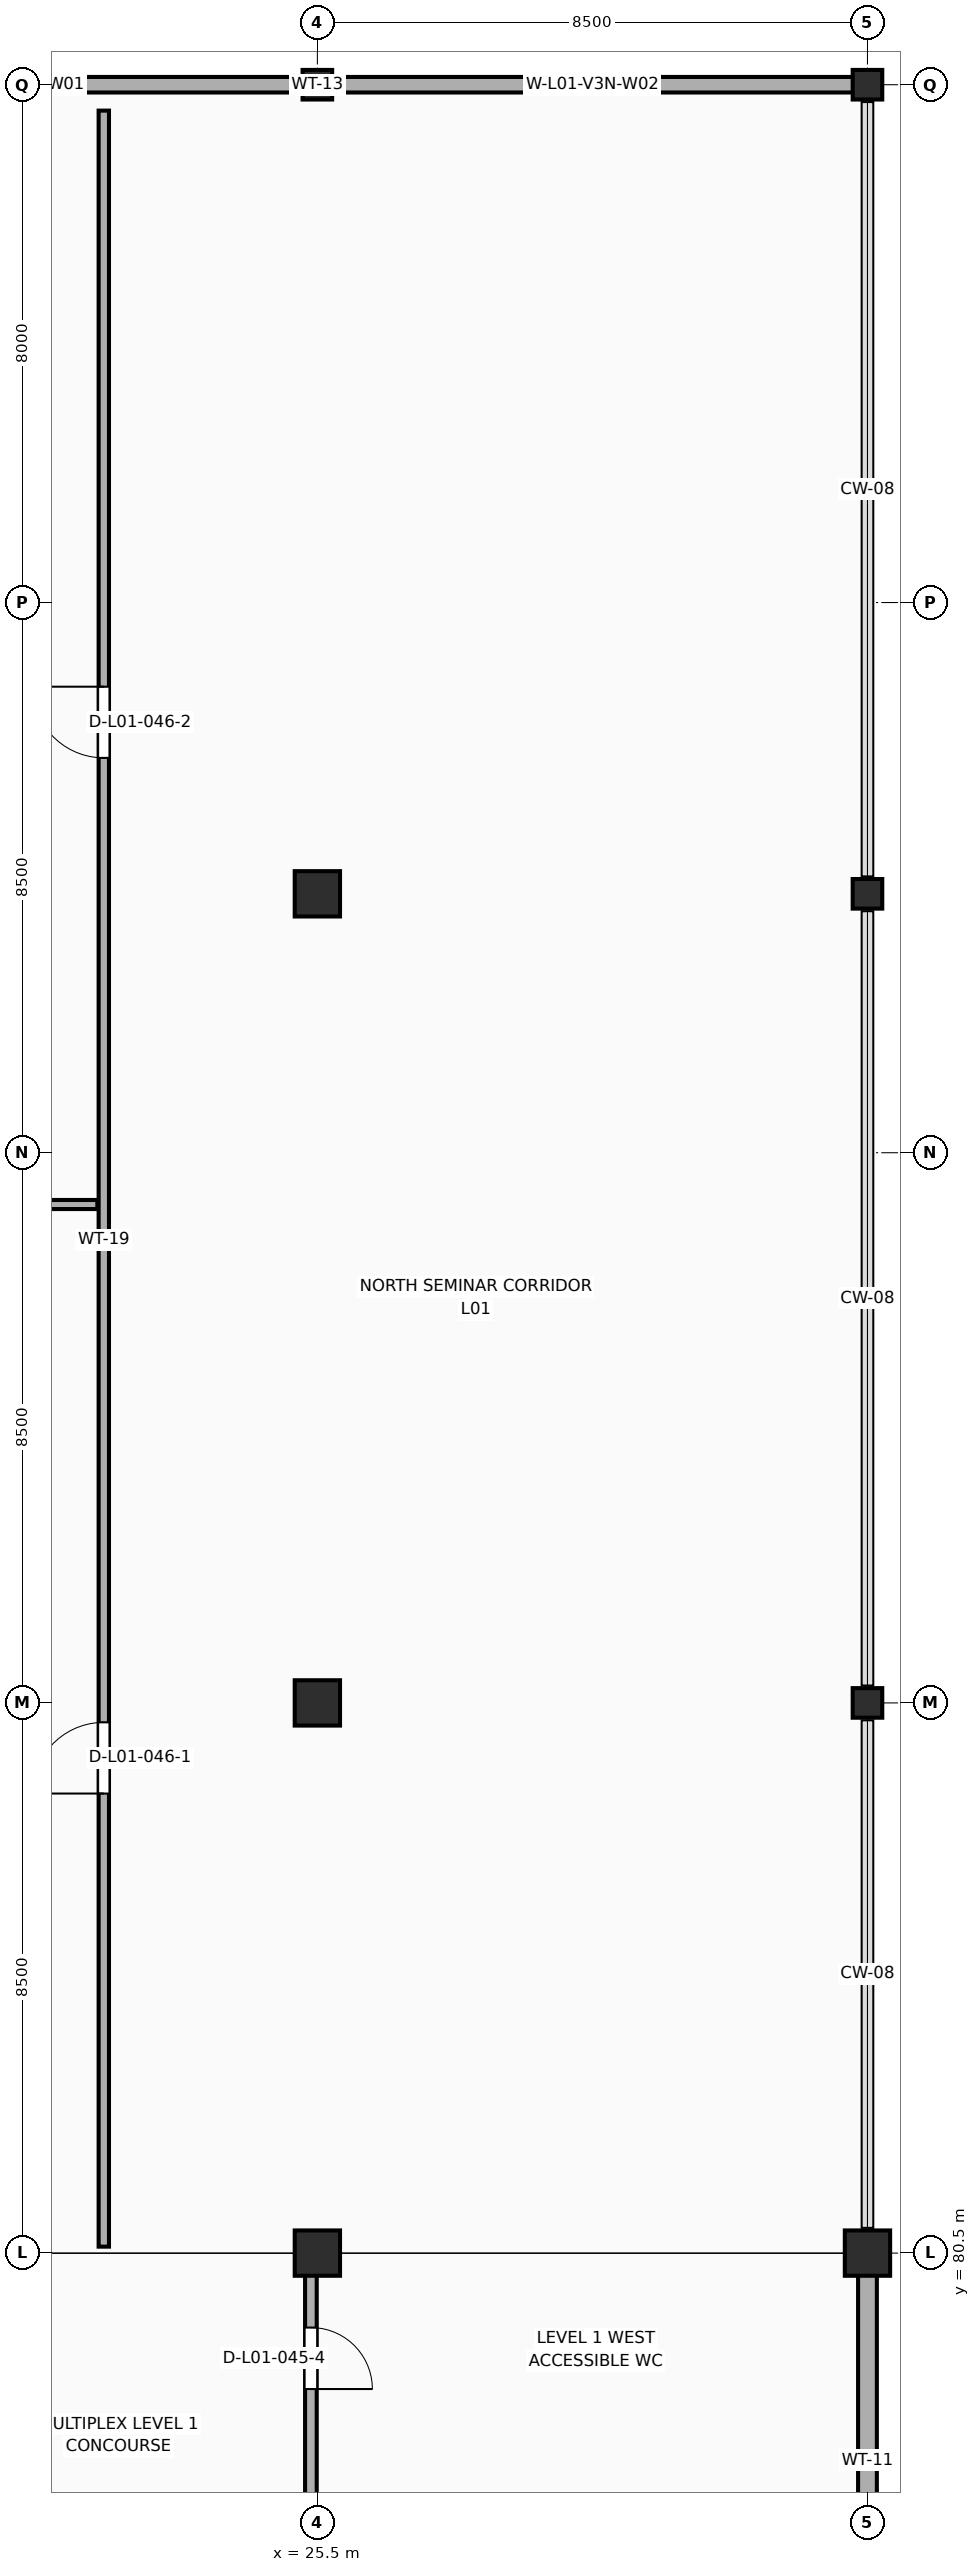
"""IFC4 building model, lengths in metres.
Left out: names, types, materials, properties, quantities, classifications, styles, units other than length and angle.
Written with IfcOpenShell. Run it as: python <this file> out.ifc"""

import sys

from ifc_helpers import new_model, si_unit, direction, frame, frame_2d, origin, origin_2d, place, context, subcontext, project, spatial, rectangle, hollow_circle, extrude, element, fill, save


model = new_model("IFC4")
c1 = context("Model", 3, precision=1e-05, world=origin(), true_north=direction((0.0, 1.0)))
c2 = subcontext(c1, "Body", "Model", "MODEL_VIEW")
j1 = project(units=[si_unit("LENGTHUNIT", "METRE"), si_unit("PLANEANGLEUNIT", "RADIAN")], contexts=[c1])
p1 = place(None, origin())
s1 = spatial("IfcSite", under=j1, at=p1, CompositionType="ELEMENT")
p2 = place(p1, origin())
s2 = spatial("IfcBuilding", under=s1, at=p2, CompositionType="ELEMENT")
p3 = place(p2, frame((0.0, 0.0, 5.4)))
s3 = spatial("IfcBuildingStorey", under=s2, at=p3, CompositionType="ELEMENT", Elevation=5.4)
for number, where, z_axis, x_axis in (
    (1, (25.5, 80.5, 0.0), (0.0, 0.0, 1.0), (1.0, 0.0, 0.0)),
    (2, (25.5, 89.0, 0.0), (0.0, 0.0, 1.0), (1.0, 0.0, 0.0)),
):
    element("IfcColumn", number, at=place(p3, frame(where, z_axis=z_axis, x_axis=x_axis)), inside=s3, PredefinedType="COLUMN", context=c2, shape_type="SweptSolid", body=[
        extrude(rectangle(XDim=0.7, YDim=0.7, at=origin_2d()), origin(), (0.0, 0.0, 1.0), 4.53),
    ])
p4 = place(p3, frame((25.5, 101.5, 0.0), z_axis=(0.0, 0.0, 1.0), x_axis=(1.0, 0.0, 0.0)))
e3 = element("IfcColumn", 3, at=p4, inside=s3, PredefinedType="COLUMN", context=c2, shape_type="SweptSolid", body=[
    extrude(rectangle(XDim=0.7, YDim=0.7, at=origin_2d()), origin(), (0.0, 0.0, 1.0), 4.54),
])
p5 = place(p3, frame((25.5, 114.0, 0.0), z_axis=(0.0, 0.0, 1.0), x_axis=(1.0, 0.0, 0.0)))
e4 = element("IfcColumn", 4, at=p5, inside=s3, PredefinedType="COLUMN", context=c2, shape_type="SweptSolid", body=[
    extrude(hollow_circle(Radius=0.229, WallThickness=0.016, at=origin_2d()), origin(), (0.0, 0.0, 1.0), 4.54),
])
p6 = place(p3, frame((34.0, 80.5, 0.0), z_axis=(0.0, 0.0, 1.0), x_axis=(1.0, 0.0, 0.0)))
e5 = element("IfcColumn", 5, at=p6, inside=s3, PredefinedType="COLUMN", context=c2, shape_type="SweptSolid", body=[
    extrude(rectangle(XDim=0.7, YDim=0.7, at=origin_2d()), origin(), (0.0, 0.0, 1.0), 4.53),
])
p7 = place(p3, frame((34.0, 89.0, 0.0), z_axis=(0.0, 0.0, 1.0), x_axis=(1.0, 0.0, 0.0)))
e6 = element("IfcColumn", 6, at=p7, inside=s3, PredefinedType="COLUMN", context=c2, shape_type="SweptSolid", body=[
    extrude(hollow_circle(Radius=0.229, WallThickness=0.016, at=origin_2d()), origin(), (0.0, 0.0, 1.0), 4.53),
])
for number, where, z_axis, x_axis in (
    (7, (34.0, 101.5, 0.0), (0.0, 0.0, 1.0), (1.0, 0.0, 0.0)),
    (8, (34.0, 114.0, 0.0), (0.0, 0.0, 1.0), (1.0, 0.0, 0.0)),
):
    element("IfcColumn", number, at=place(p3, frame(where, z_axis=z_axis, x_axis=x_axis)), inside=s3, PredefinedType="COLUMN", context=c2, shape_type="SweptSolid", body=[
        extrude(hollow_circle(Radius=0.229, WallThickness=0.016, at=origin_2d()), origin(), (0.0, 0.0, 1.0), 4.54),
    ])
p8 = place(p3, frame((34.0, 68.5, 0.0), z_axis=(0.0, 0.0, 1.0), x_axis=(0.0, 1.0, 0.0)))
e9 = element("IfcWall", 9, at=p8, inside=s3, PredefinedType="STANDARD", context=c2, shape_type="SweptSolid", body=[
    extrude(rectangle(XDim=12.0, YDim=0.29, at=frame_2d((6.0, 0.0))), origin(), (0.0, 0.0, 1.0), 4.178),
])
p9 = place(p8, frame((2.5, 0.0, 1.1)))
e10 = element("IfcOpeningElement", 10, at=p9, cuts=e9, PredefinedType="OPENING", context=c2, shape_type="SweptSolid", body=[
    extrude(rectangle(XDim=1.0, YDim=1.5, at=frame_2d((0.5, 0.75))), frame((0.0, 0.157, 0.0), z_axis=(0.0, -1.0, 0.0), x_axis=(1.0, 0.0, 0.0)), (0.0, 0.0, 1.0), 0.314),
])
p10 = place(p3, frame((17.0, 114.0, 0.0), z_axis=(0.0, 0.0, 1.0), x_axis=(1.0, 0.0, 0.0)))
e11 = element("IfcWall", 11, at=p10, inside=s3, PredefinedType="STANDARD", context=c2, shape_type="SweptSolid", body=[
    extrude(rectangle(XDim=17.0, YDim=0.24, at=frame_2d((8.5, 0.0))), origin(), (0.0, 0.0, 1.0), 4.208),
])
p11 = place(p10, frame((2.97, 0.0, 0.9)))
e12 = element("IfcOpeningElement", 12, at=p11, cuts=e11, PredefinedType="OPENING", context=c2, shape_type="SweptSolid", body=[
    extrude(rectangle(XDim=1.8, YDim=1.8, at=frame_2d((0.9, 0.9))), frame((0.0, 0.132, 0.0), z_axis=(0.0, -1.0, 0.0), x_axis=(1.0, 0.0, 0.0)), (0.0, 0.0, 1.0), 0.264),
])
p12 = place(p10, frame((11.85, 0.0, 0.9)))
e13 = element("IfcOpeningElement", 13, at=p12, cuts=e11, PredefinedType="OPENING", context=c2, shape_type="SweptSolid", body=[
    extrude(rectangle(XDim=1.8, YDim=1.8, at=frame_2d((0.9, 0.9))), frame((0.0, 0.132, 0.0), z_axis=(0.0, -1.0, 0.0), x_axis=(1.0, 0.0, 0.0)), (0.0, 0.0, 1.0), 0.264),
])
p13 = place(p3, frame((25.4, 45.0, 0.0), z_axis=(0.0, 0.0, 1.0), x_axis=(0.0, 1.0, 0.0)))
e14 = element("IfcWall", 14, at=p13, inside=s3, PredefinedType="PARTITIONING", context=c2, shape_type="SweptSolid", body=[
    extrude(rectangle(XDim=35.2, YDim=0.18, at=frame_2d((17.6, 0.0))), origin(), (0.0, 0.0, 1.0), 3.728),
])
p14 = place(p13, frame((9.0, 0.0, 0.0)))
e15 = element("IfcOpeningElement", 15, at=p14, cuts=e14, PredefinedType="OPENING", context=c2, shape_type="SweptSolid", body=[
    extrude(rectangle(XDim=1.35, YDim=2.25, at=frame_2d((0.675, 1.125))), frame((0.0, 0.102, 0.0), z_axis=(0.0, -1.0, 0.0), x_axis=(1.0, 0.0, 0.0)), (0.0, 0.0, 1.0), 0.204),
])
p15 = place(p13, frame((24.5, 0.0, 0.0)))
e16 = element("IfcOpeningElement", 16, at=p15, cuts=e14, PredefinedType="OPENING", context=c2, shape_type="SweptSolid", body=[
    extrude(rectangle(XDim=0.9, YDim=2.15, at=frame_2d((0.45, 1.075))), frame((0.0, 0.102, 0.0), z_axis=(0.0, -1.0, 0.0), x_axis=(1.0, 0.0, 0.0)), (0.0, 0.0, 1.0), 0.204),
])
p16 = place(p13, frame((29.5, 0.0, 0.0)))
e17 = element("IfcOpeningElement", 17, at=p16, cuts=e14, PredefinedType="OPENING", context=c2, shape_type="SweptSolid", body=[
    extrude(rectangle(XDim=0.9, YDim=2.15, at=frame_2d((0.45, 1.075))), frame((0.0, 0.102, 0.0), z_axis=(0.0, -1.0, 0.0), x_axis=(1.0, 0.0, 0.0)), (0.0, 0.0, 1.0), 0.204),
])
p17 = place(p13, frame((33.4, 0.0, 0.0)))
e18 = element("IfcOpeningElement", 18, at=p17, cuts=e14, PredefinedType="OPENING", context=c2, shape_type="SweptSolid", body=[
    extrude(rectangle(XDim=0.95, YDim=2.15, at=frame_2d((0.475, 1.075))), frame((0.0, 0.102, 0.0), z_axis=(0.0, -1.0, 0.0), x_axis=(1.0, 0.0, 0.0)), (0.0, 0.0, 1.0), 0.204),
])
p18 = place(p3, frame((22.2, 80.6, 0.0), z_axis=(0.0, 0.0, 1.0), x_axis=(0.0, 1.0, 0.0)))
e19 = element("IfcWall", 19, at=p18, inside=s3, PredefinedType="PARTITIONING", context=c2, shape_type="SweptSolid", body=[
    extrude(rectangle(XDim=33.0, YDim=0.16, at=frame_2d((16.5, 0.0))), origin(), (0.0, 0.0, 1.0), 4.028),
])
p19 = place(p18, frame((7.0, 0.0, 0.0)))
e20 = element("IfcOpeningElement", 20, at=p19, cuts=e19, PredefinedType="OPENING", context=c2, shape_type="SweptSolid", body=[
    extrude(rectangle(XDim=1.1, YDim=2.15, at=frame_2d((0.55, 1.075))), frame((0.0, 0.092, 0.0), z_axis=(0.0, -1.0, 0.0), x_axis=(1.0, 0.0, 0.0)), (0.0, 0.0, 1.0), 0.184),
])
p20 = place(p18, frame((23.0, 0.0, 0.0)))
e21 = element("IfcOpeningElement", 21, at=p20, cuts=e19, PredefinedType="OPENING", context=c2, shape_type="SweptSolid", body=[
    extrude(rectangle(XDim=1.1, YDim=2.15, at=frame_2d((0.55, 1.075))), frame((0.0, 0.092, 0.0), z_axis=(0.0, -1.0, 0.0), x_axis=(1.0, 0.0, 0.0)), (0.0, 0.0, 1.0), 0.184),
])
p21 = place(p3, frame((0.4, 96.7, 0.0), z_axis=(0.0, 0.0, 1.0), x_axis=(1.0, 0.0, 0.0)))
e22 = element("IfcWall", 22, at=p21, inside=s3, PredefinedType="PARTITIONING", context=c2, shape_type="SweptSolid", body=[
    extrude(rectangle(XDim=21.7, YDim=0.14, at=frame_2d((10.85, 0.0))), origin(), (0.0, 0.0, 1.0), 3.728),
])
p22 = place(p11, origin())
e23 = element("IfcWindow", 23, at=p22, inside=s3, PartitioningType="SINGLE_PANEL", PredefinedType="WINDOW", context=c2, shape_type="SweptSolid", body=[
    extrude(rectangle(XDim=1.8, YDim=1.8, at=frame_2d((0.9, 0.9))), frame((0.0, 0.03, 0.0), z_axis=(0.0, -1.0, 0.0), x_axis=(1.0, 0.0, 0.0)), (0.0, 0.0, 1.0), 0.06),
])
fill(e12, e23)
p23 = place(p12, origin())
e24 = element("IfcWindow", 24, at=p23, inside=s3, PartitioningType="SINGLE_PANEL", PredefinedType="WINDOW", context=c2, shape_type="SweptSolid", body=[
    extrude(rectangle(XDim=1.8, YDim=1.8, at=frame_2d((0.9, 0.9))), frame((0.0, 0.03, 0.0), z_axis=(0.0, -1.0, 0.0), x_axis=(1.0, 0.0, 0.0)), (0.0, 0.0, 1.0), 0.06),
])
fill(e13, e24)
p24 = place(p17, frame((0.95, 0.0, 0.0), z_axis=(0.0, 0.0, 1.0), x_axis=(-1.0, 0.0, 0.0)))
e25 = element("IfcDoor", 25, at=p24, inside=s3, OperationType="SINGLE_SWING_LEFT", PredefinedType="DOOR", context=c2, shape_type="SweptSolid", body=[
    extrude(rectangle(XDim=0.95, YDim=2.15, at=frame_2d((0.475, 1.075))), frame((0.0, 0.025, 0.0), z_axis=(0.0, -1.0, 0.0), x_axis=(1.0, 0.0, 0.0)), (0.0, 0.0, 1.0), 0.05),
])
fill(e18, e25)
p25 = place(p19, origin())
e26 = element("IfcDoor", 26, at=p25, inside=s3, OperationType="SINGLE_SWING_LEFT", PredefinedType="DOOR", context=c2, shape_type="SweptSolid", body=[
    extrude(rectangle(XDim=1.1, YDim=2.15, at=frame_2d((0.55, 1.075))), frame((0.0, 0.025, 0.0), z_axis=(0.0, -1.0, 0.0), x_axis=(1.0, 0.0, 0.0)), (0.0, 0.0, 1.0), 0.05),
])
fill(e20, e26)
p26 = place(p20, origin())
e27 = element("IfcDoor", 27, at=p26, inside=s3, OperationType="SINGLE_SWING_RIGHT", PredefinedType="DOOR", context=c2, shape_type="SweptSolid", body=[
    extrude(rectangle(XDim=1.1, YDim=2.15, at=frame_2d((0.55, 1.075))), frame((0.0, 0.025, 0.0), z_axis=(0.0, -1.0, 0.0), x_axis=(1.0, 0.0, 0.0)), (0.0, 0.0, 1.0), 0.05),
])
fill(e21, e27)
save(model, sys.argv[1])
